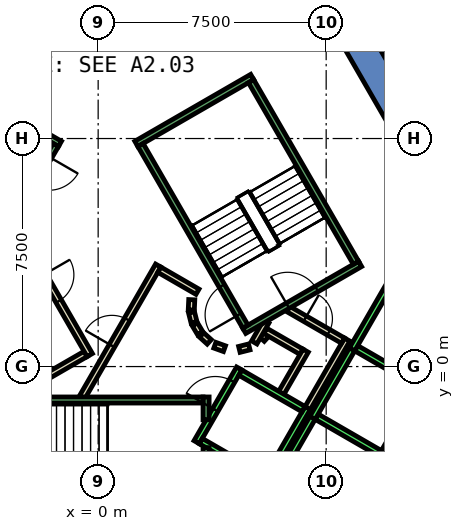
"""IFC4 building model, lengths in metres.
Left out: names, types, materials, properties, quantities, classifications, styles, units other than length and angle.
Written with IfcOpenShell. Run it as: python <this file> out.ifc"""

import sys

from ifc_helpers import new_model, si_unit, direction, frame, frame_2d, origin, place, context, subcontext, project, spatial, polyline, rectangle, outline, extrude, element, fill, save


model = new_model("IFC4")
c1 = context("Model", 3, precision=1e-05, world=origin(), true_north=direction((0.0, 1.0)))
c2 = subcontext(c1, "Body", "Model", "MODEL_VIEW")
j1 = project(units=[si_unit("LENGTHUNIT", "METRE"), si_unit("PLANEANGLEUNIT", "RADIAN")], contexts=[c1])
p1 = place(None, origin())
s1 = spatial("IfcSite", under=j1, at=p1, CompositionType="ELEMENT")
p2 = place(p1, origin())
s2 = spatial("IfcBuilding", under=s1, at=p2, CompositionType="ELEMENT")
p3 = place(p2, frame((0.0, 0.0, -5.5)))
s3 = spatial("IfcBuildingStorey", under=s2, at=p3, CompositionType="ELEMENT", Elevation=-5.5)
p4 = place(p3, frame((0.0, 0.0, -0.42)))
e1 = element("IfcWall", 1, at=p4, inside=s3, PredefinedType="SHEAR", context=c2, shape_type="SweptSolid", body=[
    extrude(outline(polyline([(8.517, 11.748), (7.651, 11.248), (12.702, 2.5), (13.856, 2.5), (8.517, 11.748)])), origin(), (0.0, 0.0, 1.0), 5.42),
])
p5 = place(p3, frame((0.0, 0.0, -0.42)))
e2 = element("IfcWall", 2, at=p5, inside=s3, PredefinedType="SHEAR", context=c2, shape_type="SweptSolid", body=[
    extrude(outline(polyline([(6.928, -9.5), (13.856, 2.5), (12.702, 2.5), (6.351, -8.5), (6.928, -9.5)])), origin(), (0.0, 0.0, 1.0), 5.42),
])
p6 = place(p3, frame((5.39, 0.898, 0.0), z_axis=(0.0, 0.0, 1.0), x_axis=(0.673828488714, 0.738887791073, 0.0)))
e3 = element("IfcWall", 3, at=p6, inside=s3, PredefinedType="PARTITIONING", context=c2, shape_type="SweptSolid", body=[
    extrude(rectangle(XDim=0.263, YDim=0.2, at=frame_2d((0.131, 0.0))), origin(), (0.0, 0.0, 1.0), 4.9),
])
p7 = place(p3, frame((5.499, 1.172, 0.0), z_axis=(0.0, 0.0, 1.0), x_axis=(0.866333505267, -0.499465972466, 0.0)))
e4 = element("IfcWall", 4, at=p7, inside=s3, PredefinedType="PARTITIONING", context=c2, shape_type="SweptSolid", body=[
    extrude(rectangle(XDim=1.374, YDim=0.2, at=frame_2d((0.687, 0.0))), origin(), (0.0, 0.0, 1.0), 4.9),
])
p8 = place(p3, frame((6.826, 0.522, 0.0), z_axis=(0.0, 0.0, 1.0), x_axis=(-0.500016722714, -0.866015748706, 0.0)))
e5 = element("IfcWall", 5, at=p8, inside=s3, PredefinedType="PARTITIONING", context=c2, shape_type="SweptSolid", body=[
    extrude(rectangle(XDim=1.7, YDim=0.2, at=frame_2d((0.85, 0.0))), origin(), (0.0, 0.0, 1.0), 4.9),
])
p9 = place(p3, frame((8.192, 0.888, 0.0), z_axis=(0.0, 0.0, 1.0), x_axis=(-0.499940625693, -0.866059680843, 0.0)))
e6 = element("IfcWall", 6, at=p9, inside=s3, PredefinedType="PARTITIONING", context=c2, shape_type="SweptSolid", body=[
    extrude(rectangle(XDim=2.68, YDim=0.2, at=frame_2d((1.34, 0.0))), origin(), (0.0, 0.0, 1.0), 4.9),
])
p10 = place(p3, frame((5.135, 0.793, 0.0), z_axis=(0.0, 0.0, 1.0), x_axis=(0.499526442893, 0.866298639529, 0.0)))
e7 = element("IfcWall", 7, at=p10, inside=s3, PredefinedType="PARTITIONING", context=c2, shape_type="SweptSolid", body=[
    extrude(rectangle(XDim=0.791, YDim=0.2, at=frame_2d((0.396, 0.0))), origin(), (0.0, 0.0, 1.0), 4.9),
])
p11 = place(p3, frame((6.25, 1.894, 0.0), z_axis=(0.0, 0.0, 1.0), x_axis=(0.866043184279, -0.499969202016, 0.0)))
e8 = element("IfcWall", 8, at=p11, inside=s3, PredefinedType="PARTITIONING", context=c2, shape_type="SweptSolid", body=[
    extrude(rectangle(XDim=2.084, YDim=0.2, at=frame_2d((1.042, 0.0))), origin(), (0.0, 0.0, 1.0), 4.9),
])
p12 = place(p11, frame((0.642, 0.0, 0.0)))
e9 = element("IfcOpeningElement", 9, at=p12, cuts=e8, PredefinedType="OPENING", context=c2, shape_type="SweptSolid", body=[
    extrude(rectangle(XDim=0.9, YDim=2.1, at=frame_2d((0.45, 1.05))), frame((0.0, 0.11, 0.0), z_axis=(0.0, -1.0, 0.0), x_axis=(1.0, 0.0, 0.0)), (0.0, 0.0, 1.0), 0.22),
])
p13 = place(p3, frame((3.079, 2.199, 0.0), z_axis=(0.0, 0.0, 1.0), x_axis=(-0.047771483479, -0.998858290933, 0.0)))
e10 = element("IfcWall", 10, at=p13, inside=s3, PredefinedType="PARTITIONING", context=c2, shape_type="SweptSolid", body=[
    extrude(rectangle(XDim=0.337, YDim=0.2, at=frame_2d((0.169, 0.0))), origin(), (0.0, 0.0, 1.0), 4.9),
])
p14 = place(p3, frame((3.07, 1.786, 0.0), z_axis=(0.0, 0.0, 1.0), x_axis=(0.242705583207, -0.970099994784, 0.0)))
e11 = element("IfcWall", 11, at=p14, inside=s3, PredefinedType="PARTITIONING", context=c2, shape_type="SweptSolid", body=[
    extrude(rectangle(XDim=0.338, YDim=0.2, at=frame_2d((0.169, 0.0))), origin(), (0.0, 0.0, 1.0), 4.9),
])
for number, where, z_axis, x_axis in (
    (12, (3.182, 1.388, 0.0), (0.0, 0.0, 1.0), (0.512, -0.859, 0.0)),
    (13, (3.404, 1.039, 0.0), (0.0, 0.0, 1.0), (0.74, -0.672, 0.0)),
):
    element("IfcWall", number, at=place(p3, frame(where, z_axis=z_axis, x_axis=x_axis)), inside=s3, PredefinedType="PARTITIONING", context=c2, shape_type="SweptSolid", body=[
        extrude(rectangle(XDim=0.338, YDim=0.2, at=frame_2d((0.169, 0.0))), origin(), (0.0, 0.0, 1.0), 4.9),
    ])
p15 = place(p3, frame((3.838, 0.702, 0.0), z_axis=(0.0, 0.0, 1.0), x_axis=(0.941035081519, -0.338308993895, 0.0)))
e14 = element("IfcWall", 14, at=p15, inside=s3, PredefinedType="PARTITIONING", context=c2, shape_type="SweptSolid", body=[
    extrude(rectangle(XDim=0.337, YDim=0.2, at=frame_2d((0.168, 0.0))), origin(), (0.0, 0.0, 1.0), 4.9),
])
p16 = place(p3, frame((4.644, 0.564, 0.0), z_axis=(0.0, 0.0, 1.0), x_axis=(0.969929076366, 0.243387729394, 0.0)))
e15 = element("IfcWall", 15, at=p16, inside=s3, PredefinedType="PARTITIONING", context=c2, shape_type="SweptSolid", body=[
    extrude(rectangle(XDim=0.337, YDim=0.2, at=frame_2d((0.168, 0.0))), origin(), (0.0, 0.0, 1.0), 4.9),
])
p17 = place(p3, frame((-0.52, -1.0, 0.0), z_axis=(0.0, 0.0, 1.0), x_axis=(0.50011622646, 0.865958290007, 0.0)))
e16 = element("IfcWall", 16, at=p17, inside=s3, PredefinedType="PARTITIONING", context=c2, shape_type="SweptSolid", body=[
    extrude(rectangle(XDim=4.991, YDim=0.2, at=frame_2d((2.496, 0.0))), origin(), (0.0, 0.0, 1.0), 4.9),
])
p18 = place(p17, frame((1.945, 0.0, 0.0)))
e17 = element("IfcOpeningElement", 17, at=p18, cuts=e16, PredefinedType="OPENING", context=c2, shape_type="SweptSolid", body=[
    extrude(rectangle(XDim=1.0, YDim=2.1, at=frame_2d((0.5, 1.05))), frame((0.0, 0.11, 0.0), z_axis=(0.0, -1.0, 0.0), x_axis=(1.0, 0.0, 0.0)), (0.0, 0.0, 1.0), 0.22),
])
p19 = place(p3, frame((2.012, 3.186, 0.0), z_axis=(0.0, 0.0, 1.0), x_axis=(0.865891012941, -0.500232699559, 0.0)))
e18 = element("IfcWall", 18, at=p19, inside=s3, PredefinedType="PARTITIONING", context=c2, shape_type="SweptSolid", body=[
    extrude(rectangle(XDim=1.449, YDim=0.2, at=frame_2d((0.725, 0.0))), origin(), (0.0, 0.0, 1.0), 4.9),
])
p20 = place(p3, frame((-0.412, 0.414, 0.0), z_axis=(0.0, 0.0, 1.0), x_axis=(-0.866017369001, -0.500013916395, 0.0)))
e19 = element("IfcWall", 19, at=p20, inside=s3, PredefinedType="PARTITIONING", context=c2, shape_type="SweptSolid", body=[
    extrude(rectangle(XDim=1.45, YDim=0.2, at=frame_2d((0.725, 0.0))), origin(), (0.0, 0.0, 1.0), 4.9),
])
p21 = place(p3, frame((-2.771, 4.7, 0.0), z_axis=(0.0, 0.0, 1.0), x_axis=(0.499969479948, -0.866043023828, 0.0)))
e20 = element("IfcWall", 20, at=p21, inside=s3, PredefinedType="PARTITIONING", context=c2, shape_type="SweptSolid", body=[
    extrude(rectangle(XDim=4.99, YDim=0.2, at=frame_2d((2.495, 0.0))), origin(), (0.0, 0.0, 1.0), 4.9),
])
p22 = place(p21, frame((1.945, 0.0, 0.0)))
e21 = element("IfcOpeningElement", 21, at=p22, cuts=e20, PredefinedType="OPENING", context=c2, shape_type="SweptSolid", body=[
    extrude(rectangle(XDim=1.0, YDim=2.1, at=frame_2d((0.5, 1.05))), frame((0.0, 0.11, 0.0), z_axis=(0.0, -1.0, 0.0), x_axis=(1.0, 0.0, 0.0)), (0.0, 0.0, 1.0), 0.22),
])
p23 = place(p3, frame((3.24, -2.488, 0.0), z_axis=(0.0, 0.0, 1.0), x_axis=(0.49994636267, 0.866056369097, 0.0)))
e22 = element("IfcWall", 22, at=p23, inside=s3, PredefinedType="STANDARD", context=c2, shape_type="SweptSolid", body=[
    extrude(rectangle(XDim=2.8, YDim=0.2, at=frame_2d((1.4, 0.0))), origin(), (0.0, 0.0, 1.0), 4.9),
])
p24 = place(p23, frame((1.225, 0.0, 0.0)))
e23 = element("IfcOpeningElement", 23, at=p24, cuts=e22, PredefinedType="OPENING", context=c2, shape_type="SweptSolid", body=[
    extrude(rectangle(XDim=1.1, YDim=2.1, at=frame_2d((0.55, 1.05))), frame((0.0, 0.11, 0.0), z_axis=(0.0, -1.0, 0.0), x_axis=(1.0, 0.0, 0.0)), (0.0, 0.0, 1.0), 0.22),
])
p25 = place(p3, frame((5.492, -3.788, 0.0), z_axis=(0.0, 0.0, 1.0), x_axis=(0.500011755427, 0.866018616679, 0.0)))
e24 = element("IfcWall", 24, at=p25, inside=s3, PredefinedType="STANDARD", context=c2, shape_type="SweptSolid", body=[
    extrude(rectangle(XDim=2.8, YDim=0.2, at=frame_2d((1.4, 0.0))), origin(), (0.0, 0.0, 1.0), 4.9),
])
p26 = place(p3, frame((3.377, -2.452, 0.0), z_axis=(0.0, 0.0, 1.0), x_axis=(0.865955154139, -0.50012165622, 0.0)))
e25 = element("IfcWall", 25, at=p26, inside=s3, PredefinedType="STANDARD", context=c2, shape_type="SweptSolid", body=[
    extrude(rectangle(XDim=2.4, YDim=0.2, at=frame_2d((1.2, 0.0))), origin(), (0.0, 0.0, 1.0), 4.9),
])
p27 = place(p3, frame((4.677, -0.2, 0.0), z_axis=(0.0, 0.0, 1.0), x_axis=(0.865973769406, -0.500089422704, 0.0)))
e26 = element("IfcWall", 26, at=p27, inside=s3, PredefinedType="STANDARD", context=c2, shape_type="SweptSolid", body=[
    extrude(rectangle(XDim=2.399, YDim=0.2, at=frame_2d((1.2, 0.0))), origin(), (0.0, 0.0, 1.0), 4.9),
])
p28 = place(p3, frame((5.751, -3.938, 0.0), z_axis=(0.0, 0.0, 1.0), x_axis=(0.49994636267, 0.866056369097, 0.0)))
e27 = element("IfcWall", 27, at=p28, inside=s3, PredefinedType="STANDARD", context=c2, shape_type="SweptSolid", body=[
    extrude(rectangle(XDim=2.8, YDim=0.2, at=frame_2d((1.4, 0.0))), origin(), (0.0, 0.0, 1.0), 3.6),
])
p29 = place(p3, frame((8.003, -5.238, 0.0), z_axis=(0.0, 0.0, 1.0), x_axis=(0.500011755427, 0.866018616679, 0.0)))
e28 = element("IfcWall", 28, at=p29, inside=s3, PredefinedType="STANDARD", context=c2, shape_type="SweptSolid", body=[
    extrude(rectangle(XDim=2.8, YDim=0.2, at=frame_2d((1.4, 0.0))), origin(), (0.0, 0.0, 1.0), 3.6),
])
p30 = place(p3, frame((7.188, -1.65, 0.0), z_axis=(0.0, 0.0, 1.0), x_axis=(0.865955154139, -0.50012165622, 0.0)))
e29 = element("IfcWall", 29, at=p30, inside=s3, PredefinedType="STANDARD", context=c2, shape_type="SweptSolid", body=[
    extrude(rectangle(XDim=2.4, YDim=0.2, at=frame_2d((1.2, 0.0))), origin(), (0.0, 0.0, 1.0), 3.6),
])
for number, where, z_axis, x_axis in (
    (30, (7.051, -1.687, 0.0), (0.0, 0.0, 1.0), (0.5, 0.866, 0.0)),
    (31, (9.303, -2.987, 0.0), (0.0, 0.0, 1.0), (0.5, 0.866, 0.0)),
):
    element("IfcWall", number, at=place(p3, frame(where, z_axis=z_axis, x_axis=x_axis)), inside=s3, PredefinedType="STANDARD", context=c2, shape_type="SweptSolid", body=[
        extrude(rectangle(XDim=2.8, YDim=0.2, at=frame_2d((1.4, 0.0))), origin(), (0.0, 0.0, 1.0), 3.6),
    ])
p31 = place(p3, frame((8.488, 0.602, 0.0), z_axis=(0.0, 0.0, 1.0), x_axis=(0.865973769406, -0.500089422704, 0.0)))
e32 = element("IfcWall", 32, at=p31, inside=s3, PredefinedType="STANDARD", context=c2, shape_type="SweptSolid", body=[
    extrude(rectangle(XDim=2.399, YDim=0.2, at=frame_2d((1.2, 0.0))), origin(), (0.0, 0.0, 1.0), 3.6),
])
p32 = place(p3, frame((8.351, 0.565, 0.0), z_axis=(0.0, 0.0, 1.0), x_axis=(0.49994636267, 0.866056369097, 0.0)))
e33 = element("IfcWall", 33, at=p32, inside=s3, PredefinedType="STANDARD", context=c2, shape_type="SweptSolid", body=[
    extrude(rectangle(XDim=2.8, YDim=0.2, at=frame_2d((1.4, 0.0))), origin(), (0.0, 0.0, 1.0), 3.6),
])
p33 = place(p3, frame((3.55, -2.667, 0.0), z_axis=(0.0, 0.0, 1.0), x_axis=(0.0, -1.0, 0.0)))
e34 = element("IfcWall", 34, at=p33, inside=s3, PredefinedType="STANDARD", context=c2, shape_type="SweptSolid", body=[
    extrude(rectangle(XDim=2.733, YDim=0.2, at=frame_2d((1.366, 0.0))), origin(), (0.0, 0.0, 1.0), 4.9),
])
p34 = place(p3, frame((3.55, -1.0, 0.0), z_axis=(0.0, 0.0, 1.0), x_axis=(0.0, -1.0, 0.0)))
e35 = element("IfcWall", 35, at=p34, inside=s3, PredefinedType="STANDARD", context=c2, shape_type="SweptSolid", body=[
    extrude(rectangle(XDim=0.751, YDim=0.2, at=frame_2d((0.375, 0.0))), origin(), (0.0, 0.0, 1.0), 4.9),
])
p35 = place(p3, frame((-3.45, -1.1, 0.0), z_axis=(0.0, 0.0, 1.0), x_axis=(1.0, 0.0, 0.0)))
e36 = element("IfcWall", 36, at=p35, inside=s3, PredefinedType="STANDARD", context=c2, shape_type="SweptSolid", body=[
    extrude(rectangle(XDim=6.9, YDim=0.2, at=frame_2d((3.45, 0.0))), origin(), (0.0, 0.0, 1.0), 4.9),
])
p36 = place(p35, frame((0.45, 0.0, 0.0)))
e37 = element("IfcOpeningElement", 37, at=p36, cuts=e36, PredefinedType="OPENING", context=c2, shape_type="SweptSolid", body=[
    extrude(rectangle(XDim=1.1, YDim=2.2, at=frame_2d((0.55, 1.1))), frame((0.0, 0.11, 0.0), z_axis=(0.0, -1.0, 0.0), x_axis=(1.0, 0.0, 0.0)), (0.0, 0.0, 1.0), 0.22),
])
p37 = place(p3, frame((4.806, 1.176, 0.0), z_axis=(0.0, 0.0, 1.0), x_axis=(0.866059941101, 0.499940174841, 0.0)))
e38 = element("IfcWall", 38, at=p37, inside=s3, PredefinedType="STANDARD", context=c2, shape_type="SweptSolid", body=[
    extrude(rectangle(XDim=4.4, YDim=0.2, at=frame_2d((2.2, 0.0))), origin(), (0.0, 0.0, 1.0), 4.9),
])
p38 = place(p37, frame((1.65, 0.0, 0.0)))
e39 = element("IfcOpeningElement", 39, at=p38, cuts=e38, PredefinedType="OPENING", context=c2, shape_type="SweptSolid", body=[
    extrude(rectangle(XDim=1.1, YDim=2.2, at=frame_2d((0.55, 1.1))), frame((0.0, 0.11, 0.0), z_axis=(0.0, -1.0, 0.0), x_axis=(1.0, 0.0, 0.0)), (0.0, 0.0, 1.0), 0.22),
])
p39 = place(p3, frame((1.256, 7.324, 0.0), z_axis=(0.0, 0.0, 1.0), x_axis=(0.866046073146, 0.499964197906, 0.0)))
e40 = element("IfcWall", 40, at=p39, inside=s3, PredefinedType="STANDARD", context=c2, shape_type="SweptSolid", body=[
    extrude(rectangle(XDim=4.4, YDim=0.2, at=frame_2d((2.2, 0.0))), origin(), (0.0, 0.0, 1.0), 4.9),
])
p40 = place(p3, frame((4.843, 1.312, 0.0), z_axis=(0.0, 0.0, 1.0), x_axis=(-0.499963383562, 0.866046543262, 0.0)))
e41 = element("IfcWall", 41, at=p40, inside=s3, PredefinedType="STANDARD", context=c2, shape_type="SweptSolid", body=[
    extrude(rectangle(XDim=6.9, YDim=0.2, at=frame_2d((3.45, 0.0))), origin(), (0.0, 0.0, 1.0), 4.9),
])
p41 = place(p40, frame((0.45, 0.0, 0.0)))
e42 = element("IfcOpeningElement", 42, at=p41, cuts=e41, PredefinedType="OPENING", context=c2, shape_type="SweptSolid", body=[
    extrude(rectangle(XDim=1.1, YDim=2.2, at=frame_2d((0.55, 1.1))), frame((0.0, 0.11, 0.0), z_axis=(0.0, -1.0, 0.0), x_axis=(1.0, 0.0, 0.0)), (0.0, 0.0, 1.0), 0.22),
])
p42 = place(p3, frame((8.48, 3.412, 0.0), z_axis=(0.0, 0.0, 1.0), x_axis=(-0.499978703459, 0.866037698999, 0.0)))
e43 = element("IfcWall", 43, at=p42, inside=s3, PredefinedType="STANDARD", context=c2, shape_type="SweptSolid", body=[
    extrude(rectangle(XDim=6.9, YDim=0.2, at=frame_2d((3.45, 0.0))), origin(), (0.0, 0.0, 1.0), 4.9),
])
p43 = place(p3, frame((-1.256, 7.324, 0.0), z_axis=(0.0, 0.0, 1.0), x_axis=(-0.866046073146, 0.499964197906, 0.0)))
e44 = element("IfcWall", 44, at=p43, inside=s3, PredefinedType="STANDARD", context=c2, shape_type="SweptSolid", body=[
    extrude(rectangle(XDim=4.4, YDim=0.2, at=frame_2d((2.2, 0.0))), origin(), (0.0, 0.0, 1.0), 4.9),
])
p44 = place(p43, frame((1.65, 0.0, 0.0)))
e45 = element("IfcOpeningElement", 45, at=p44, cuts=e44, PredefinedType="OPENING", context=c2, shape_type="SweptSolid", body=[
    extrude(rectangle(XDim=1.1, YDim=2.2, at=frame_2d((0.55, 1.1))), frame((0.0, 0.11, 0.0), z_axis=(0.0, -1.0, 0.0), x_axis=(1.0, 0.0, 0.0)), (0.0, 0.0, 1.0), 0.22),
])
p45 = place(p3, frame((-1.393, 7.288, 0.0), z_axis=(0.0, 0.0, 1.0), x_axis=(-0.499963383562, -0.866046543262, 0.0)))
e46 = element("IfcWall", 46, at=p45, inside=s3, PredefinedType="STANDARD", context=c2, shape_type="SweptSolid", body=[
    extrude(rectangle(XDim=6.9, YDim=0.2, at=frame_2d((3.45, 0.0))), origin(), (0.0, 0.0, 1.0), 4.9),
])
p46 = place(p45, frame((0.45, 0.0, 0.0)))
e47 = element("IfcOpeningElement", 47, at=p46, cuts=e46, PredefinedType="OPENING", context=c2, shape_type="SweptSolid", body=[
    extrude(rectangle(XDim=1.1, YDim=2.2, at=frame_2d((0.55, 1.1))), frame((0.0, 0.11, 0.0), z_axis=(0.0, -1.0, 0.0), x_axis=(1.0, 0.0, 0.0)), (0.0, 0.0, 1.0), 0.22),
])
p47 = place(p18, origin())
e48 = element("IfcDoor", 48, at=p47, inside=s3, OperationType="SINGLE_SWING_LEFT", PredefinedType="DOOR", context=c2, shape_type="SweptSolid", body=[
    extrude(rectangle(XDim=1.0, YDim=2.1, at=frame_2d((0.5, 1.05))), frame((0.0, 0.025, 0.0), z_axis=(0.0, -1.0, 0.0), x_axis=(1.0, 0.0, 0.0)), (0.0, 0.0, 1.0), 0.05),
])
fill(e17, e48)
p48 = place(p22, origin())
e49 = element("IfcDoor", 49, at=p48, inside=s3, OperationType="SINGLE_SWING_RIGHT", PredefinedType="DOOR", context=c2, shape_type="SweptSolid", body=[
    extrude(rectangle(XDim=1.0, YDim=2.1, at=frame_2d((0.5, 1.05))), frame((0.0, 0.025, 0.0), z_axis=(0.0, -1.0, 0.0), x_axis=(1.0, 0.0, 0.0)), (0.0, 0.0, 1.0), 0.05),
])
fill(e21, e49)
p49 = place(p12, origin())
e50 = element("IfcDoor", 50, at=p49, inside=s3, OperationType="SINGLE_SWING_LEFT", PredefinedType="DOOR", context=c2, shape_type="SweptSolid", body=[
    extrude(rectangle(XDim=0.9, YDim=2.1, at=frame_2d((0.45, 1.05))), frame((0.0, 0.025, 0.0), z_axis=(0.0, -1.0, 0.0), x_axis=(1.0, 0.0, 0.0)), (0.0, 0.0, 1.0), 0.05),
])
fill(e9, e50)
p50 = place(p24, origin())
e51 = element("IfcDoor", 51, at=p50, inside=s3, OperationType="SLIDING_TO_LEFT", PredefinedType="DOOR", context=c2, shape_type="SweptSolid", body=[
    extrude(rectangle(XDim=1.1, YDim=2.1, at=frame_2d((0.55, 1.05))), frame((0.0, 0.025, 0.0), z_axis=(0.0, -1.0, 0.0), x_axis=(1.0, 0.0, 0.0)), (0.0, 0.0, 1.0), 0.05),
])
fill(e23, e51)
p51 = place(p41, origin())
e52 = element("IfcDoor", 52, at=p51, inside=s3, OperationType="SINGLE_SWING_LEFT", PredefinedType="DOOR", context=c2, shape_type="SweptSolid", body=[
    extrude(rectangle(XDim=1.1, YDim=2.2, at=frame_2d((0.55, 1.1))), frame((0.0, 0.025, 0.0), z_axis=(0.0, -1.0, 0.0), x_axis=(1.0, 0.0, 0.0)), (0.0, 0.0, 1.0), 0.05),
])
fill(e42, e52)
p52 = place(p38, origin())
e53 = element("IfcDoor", 53, at=p52, inside=s3, OperationType="SINGLE_SWING_LEFT", PredefinedType="DOOR", context=c2, shape_type="SweptSolid", body=[
    extrude(rectangle(XDim=1.1, YDim=2.2, at=frame_2d((0.55, 1.1))), frame((0.0, 0.025, 0.0), z_axis=(0.0, -1.0, 0.0), x_axis=(1.0, 0.0, 0.0)), (0.0, 0.0, 1.0), 0.05),
])
fill(e39, e53)
save(model, sys.argv[1])
